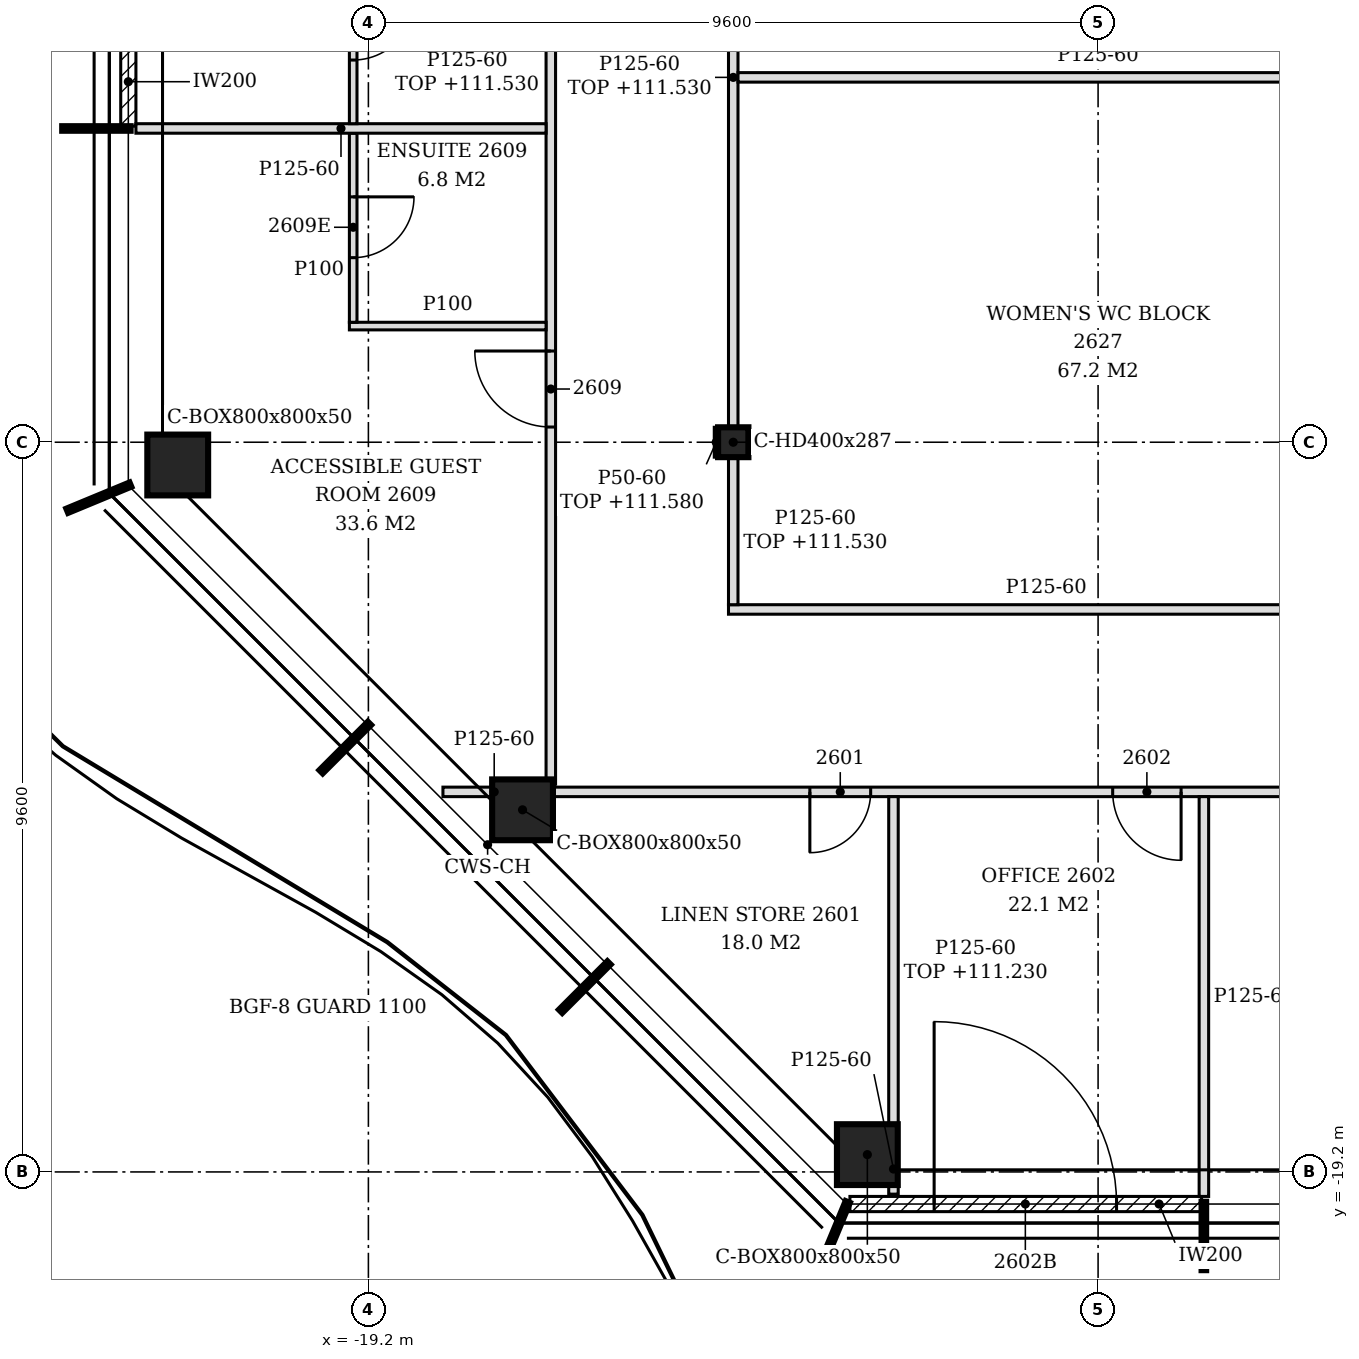
"""IFC4 building model, lengths in metres.
Left out: names, types, materials, properties, quantities, classifications, styles, units other than length and angle.
Written with IfcOpenShell. Run it as: python <this file> out.ifc"""

import sys

from ifc_helpers import new_model, si_unit, direction, frame, frame_2d, origin, origin_2d, place, context, subcontext, project, spatial, polyline, rectangle, hollow_rectangle, i_section, outline, extrude, clip, halfspace, element, fill, save


model = new_model("IFC4")
c1 = context("Model", 3, precision=1e-05, world=origin(), true_north=direction((0.0, 1.0)))
c2 = subcontext(c1, "Body", "Model", "MODEL_VIEW")
j1 = project(units=[si_unit("LENGTHUNIT", "METRE"), si_unit("PLANEANGLEUNIT", "RADIAN")], contexts=[c1])
p1 = place(None, origin())
s1 = spatial("IfcSite", under=j1, at=p1, CompositionType="ELEMENT")
p2 = place(p1, origin())
s2 = spatial("IfcBuilding", under=s1, at=p2, CompositionType="ELEMENT")
p3 = place(p2, frame((0.0, 0.0, 108.6)))
s3 = spatial("IfcBuildingStorey", under=s2, at=p3, CompositionType="ELEMENT", Elevation=108.6)
for number, where, z_axis, x_axis in (
    (1, (-12.635, -18.972, -0.15), (0.186, 0.124, 0.975), (-0.555, 0.832, 0.0)),
    (2, (-21.708, -9.899, -0.15), (0.186, 0.124, 0.975), (-0.555, 0.832, 0.0)),
    (3, (-17.172, -14.436, -0.15), (0.186, 0.124, 0.975), (-0.555, 0.832, 0.0)),
):
    element("IfcColumn", number, at=place(p3, frame(where, z_axis=z_axis, x_axis=x_axis)), inside=s3, PredefinedType="COLUMN", context=c2, shape_type="Clipping", body=[
        clip(clip(extrude(hollow_rectangle(XDim=0.8, YDim=0.8, WallThickness=0.05, at=origin_2d()), origin(), (0.0, 0.0, 1.0), 3.694), halfspace(frame((0.0, 0.0, 0.024), z_axis=(0.0, 0.0, 1.0), x_axis=(1.0, 0.0, 0.0)), True)), halfspace(frame((0.0, 0.0, 3.67), z_axis=(0.0, 0.0, 1.0), x_axis=(1.0, 0.0, 0.0)), False)),
    ])
p4 = place(p3, frame((-14.4, -9.6, -0.15), z_axis=(0.0, 0.0, 1.0), x_axis=(1.0, 0.0, 0.0)))
e4 = element("IfcColumn", 4, at=p4, inside=s3, PredefinedType="COLUMN", context=c2, shape_type="SweptSolid", body=[
    extrude(i_section(OverallWidth=0.399, OverallDepth=0.393, WebThickness=0.023, FlangeThickness=0.037, FilletRadius=0.015, at=origin_2d()), origin(), (0.0, 0.0, 1.0), 3.6),
])
p5 = place(p3, frame((-12.865, -19.622, 0.0), z_axis=(0.0, 0.0, 1.0), x_axis=(1.0, 0.0, 0.0)))
e5 = element("IfcWall", 5, at=p5, inside=s3, PredefinedType="NOTDEFINED", context=c2, shape_type="SweptSolid", body=[
    extrude(rectangle(XDim=4.626, YDim=0.2, at=frame_2d((2.313, 0.0))), origin(), (0.0, 0.0, 1.0), 3.45),
])
p6 = place(p5, frame((1.108, 0.0, 0.0)))
e6 = element("IfcOpeningElement", 6, at=p6, cuts=e5, PredefinedType="OPENING", context=c2, shape_type="SweptSolid", body=[
    extrude(rectangle(XDim=2.4, YDim=2.4, at=frame_2d((1.2, 1.2))), frame((0.0, 0.11, 0.0), z_axis=(0.0, -1.0, 0.0), x_axis=(1.0, 0.0, 0.0)), (0.0, 0.0, 1.0), 0.22),
])
p7 = place(p3, frame((-22.358, -0.702, 0.0), z_axis=(0.0, 0.0, 1.0), x_axis=(0.0, -1.0, 0.0)))
e7 = element("IfcWall", 7, at=p7, inside=s3, PredefinedType="NOTDEFINED", context=c2, shape_type="SweptSolid", body=[
    extrude(rectangle(XDim=4.74, YDim=0.2, at=frame_2d((2.37, 0.0))), origin(), (0.0, 0.0, 1.0), 3.45),
])
p8 = place(p7, frame((1.17, 0.0, 0.0)))
e8 = element("IfcOpeningElement", 8, at=p8, cuts=e7, PredefinedType="OPENING", context=c2, shape_type="SweptSolid", body=[
    extrude(rectangle(XDim=2.4, YDim=2.4, at=frame_2d((1.2, 1.2))), frame((0.0, 0.11, 0.0), z_axis=(0.0, -1.0, 0.0), x_axis=(1.0, 0.0, 0.0)), (0.0, 0.0, 1.0), 0.22),
])
p9 = place(p3, frame((-12.292, -19.492, 0.0), z_axis=(0.0, 0.0, 1.0), x_axis=(0.0, 1.0, 0.0)))
e9 = element("IfcWall", 9, at=p9, inside=s3, PredefinedType="PARTITIONING", context=c2, shape_type="SweptSolid", body=[
    extrude(outline(polyline([(0.0, 0.0), (0.227, 0.0), (0.227, 0.862), (0.227, 1.725), (0.308, 2.587), (0.661, 3.45), (0.0, 3.45), (0.0, 2.587), (0.0, 1.725), (0.0, 0.862), (0.0, 0.0)])), frame((0.0, 0.062, 0.0), z_axis=(0.0, -1.0, 0.0), x_axis=(1.0, 0.0, 0.0)), (0.0, 0.0, 1.0), 0.125),
])
p10 = place(p3, frame((-8.208, -19.522, 0.0), z_axis=(0.0, 0.0, 1.0), x_axis=(0.0, 1.0, 0.0)))
e10 = element("IfcWall", 10, at=p10, inside=s3, PredefinedType="PARTITIONING", context=c2, shape_type="SweptSolid", body=[
    extrude(outline(polyline([(0.0, 0.0), (5.26, 0.0), (5.26, 3.45), (5.009, 3.45), (5.007, 2.93), (4.809, 2.93), (4.807, 3.45), (1.159, 3.45), (1.156, 2.93), (0.859, 2.93), (0.857, 3.45), (0.0, 3.45), (0.0, 0.0)])), frame((0.0, 0.062, 0.0), z_axis=(0.0, -1.0, 0.0), x_axis=(1.0, 0.0, 0.0)), (0.0, 0.0, 1.0), 0.125),
])
p11 = place(p3, frame((-12.292, -18.592, 0.0), z_axis=(0.0, 0.0, 1.0), x_axis=(0.0, 1.0, 0.0)))
e11 = element("IfcWall", 11, at=p11, inside=s3, PredefinedType="PARTITIONING", context=c2, shape_type="SweptSolid", body=[
    extrude(outline(polyline([(0.0, 0.0), (4.33, 0.0), (4.33, 0.862), (4.33, 1.725), (4.33, 2.587), (4.33, 2.63), (0.371, 2.63), (0.371, 2.587), (0.371, 1.725), (0.309, 0.862), (0.0, 0.0)])), frame((0.0, 0.062, 0.0), z_axis=(0.0, -1.0, 0.0), x_axis=(1.0, 0.0, 0.0)), (0.0, 0.0, 1.0), 0.125),
])
p12 = place(p3, frame((-18.219, -14.2, 0.0), z_axis=(0.0, 0.0, 1.0), x_axis=(1.0, 0.0, 0.0)))
e12 = element("IfcWall", 12, at=p12, inside=s3, PredefinedType="PARTITIONING", context=c2, shape_type="SweptSolid", body=[
    extrude(outline(polyline([(0.0, 0.0), (0.586, 0.0), (0.677, 0.862), (0.873, 1.725), (1.111, 2.587), (1.349, 3.45), (0.0, 3.45), (0.0, 2.587), (0.0, 1.725), (0.0, 0.862), (0.0, 0.0)])), frame((0.0, 0.062, 0.0), z_axis=(0.0, -1.0, 0.0), x_axis=(1.0, 0.0, 0.0)), (0.0, 0.0, 1.0), 0.125),
])
p13 = place(p3, frame((-16.753, -14.2, 0.0), z_axis=(0.0, 0.0, 1.0), x_axis=(1.0, 0.0, 0.0)))
e13 = element("IfcWall", 13, at=p13, inside=s3, PredefinedType="PARTITIONING", context=c2, shape_type="SweptSolid", body=[
    extrude(outline(polyline([(0.0, 0.0), (43.232, 0.0), (43.232, 0.862), (43.232, 1.725), (43.232, 2.587), (43.232, 2.63), (0.671, 2.63), (0.667, 2.587), (0.476, 1.725), (0.238, 0.862), (0.0, 0.0)])), frame((0.0, 0.062, 0.0), z_axis=(0.0, -1.0, 0.0), x_axis=(1.0, 0.0, 0.0)), (0.0, 0.0, 1.0), 0.125),
])
p14 = place(p13, frame((3.361, 0.0, 0.0)))
e14 = element("IfcOpeningElement", 14, at=p14, cuts=e13, PredefinedType="OPENING", context=c2, shape_type="SweptSolid", body=[
    extrude(rectangle(XDim=0.8, YDim=2.1, at=frame_2d((0.4, 1.05))), frame((0.0, 0.073, 0.0), z_axis=(0.0, -1.0, 0.0), x_axis=(1.0, 0.0, 0.0)), (0.0, 0.0, 1.0), 0.145),
])
p15 = place(p13, frame((7.345, 0.0, 0.0)))
e15 = element("IfcOpeningElement", 15, at=p15, cuts=e13, PredefinedType="OPENING", context=c2, shape_type="SweptSolid", body=[
    extrude(rectangle(XDim=0.9, YDim=2.1, at=frame_2d((0.45, 1.05))), frame((0.0, 0.073, 0.0), z_axis=(0.0, -1.0, 0.0), x_axis=(1.0, 0.0, 0.0)), (0.0, 0.0, 1.0), 0.145),
])
p16 = place(p13, frame((12.675, 0.0, 0.0)))
e16 = element("IfcOpeningElement", 16, at=p16, cuts=e13, PredefinedType="OPENING", context=c2, shape_type="SweptSolid", body=[
    extrude(rectangle(XDim=0.9, YDim=2.1, at=frame_2d((0.45, 1.05))), frame((0.0, 0.073, 0.0), z_axis=(0.0, -1.0, 0.0), x_axis=(1.0, 0.0, 0.0)), (0.0, 0.0, 1.0), 0.145),
])
p17 = place(p13, frame((16.945, 0.0, 0.0)))
e17 = element("IfcOpeningElement", 17, at=p17, cuts=e13, PredefinedType="OPENING", context=c2, shape_type="SweptSolid", body=[
    extrude(rectangle(XDim=0.9, YDim=2.1, at=frame_2d((0.45, 1.05))), frame((0.0, 0.073, 0.0), z_axis=(0.0, -1.0, 0.0), x_axis=(1.0, 0.0, 0.0)), (0.0, 0.0, 1.0), 0.145),
])
p18 = place(p13, frame((22.089, 0.0, 0.0)))
e18 = element("IfcOpeningElement", 18, at=p18, cuts=e13, PredefinedType="OPENING", context=c2, shape_type="SweptSolid", body=[
    extrude(rectangle(XDim=0.9, YDim=2.1, at=frame_2d((0.45, 1.05))), frame((0.0, 0.073, 0.0), z_axis=(0.0, -1.0, 0.0), x_axis=(1.0, 0.0, 0.0)), (0.0, 0.0, 1.0), 0.145),
])
p19 = place(p13, frame((25.745, 0.0, 0.0)))
e19 = element("IfcOpeningElement", 19, at=p19, cuts=e13, PredefinedType="OPENING", context=c2, shape_type="SweptSolid", body=[
    extrude(rectangle(XDim=0.9, YDim=2.1, at=frame_2d((0.45, 1.05))), frame((0.0, 0.073, 0.0), z_axis=(0.0, -1.0, 0.0), x_axis=(1.0, 0.0, 0.0)), (0.0, 0.0, 1.0), 0.145),
])
p20 = place(p13, frame((28.102, 0.0, 0.0)))
e20 = element("IfcOpeningElement", 20, at=p20, cuts=e13, PredefinedType="OPENING", context=c2, shape_type="SweptSolid", body=[
    extrude(rectangle(XDim=0.9, YDim=2.1, at=frame_2d((0.45, 1.05))), frame((0.0, 0.073, 0.0), z_axis=(0.0, -1.0, 0.0), x_axis=(1.0, 0.0, 0.0)), (0.0, 0.0, 1.0), 0.145),
])
p21 = place(p13, frame((33.953, 0.0, 0.0)))
e21 = element("IfcOpeningElement", 21, at=p21, cuts=e13, PredefinedType="OPENING", context=c2, shape_type="SweptSolid", body=[
    extrude(rectangle(XDim=0.9, YDim=2.1, at=frame_2d((0.45, 1.05))), frame((0.0, 0.073, 0.0), z_axis=(0.0, -1.0, 0.0), x_axis=(1.0, 0.0, 0.0)), (0.0, 0.0, 1.0), 0.145),
])
p22 = place(p13, frame((36.295, 0.0, 0.0)))
e22 = element("IfcOpeningElement", 22, at=p22, cuts=e13, PredefinedType="OPENING", context=c2, shape_type="SweptSolid", body=[
    extrude(rectangle(XDim=0.8, YDim=2.1, at=frame_2d((0.4, 1.05))), frame((0.0, 0.073, 0.0), z_axis=(0.0, -1.0, 0.0), x_axis=(1.0, 0.0, 0.0)), (0.0, 0.0, 1.0), 0.145),
])
p23 = place(p3, frame((-16.8, -14.098, 0.0), z_axis=(0.0, 0.0, 1.0), x_axis=(0.0, 1.0, 0.0)))
e23 = element("IfcWall", 23, at=p23, inside=s3, PredefinedType="PARTITIONING", context=c2, shape_type="SweptSolid", body=[
    extrude(outline(polyline([(0.0, 0.0), (36.515, 0.0), (36.515, 0.862), (36.515, 1.725), (36.578, 2.587), (36.701, 2.93), (0.433, 2.93), (0.433, 2.587), (0.433, 1.725), (0.352, 0.862), (0.0, 0.0)])), frame((0.0, 0.062, 0.0), z_axis=(0.0, -1.0, 0.0), x_axis=(1.0, 0.0, 0.0)), (0.0, 0.0, 1.0), 0.125),
])
p24 = place(p23, frame((4.698, 0.0, 0.0)))
e24 = element("IfcOpeningElement", 24, at=p24, cuts=e23, PredefinedType="OPENING", context=c2, shape_type="SweptSolid", body=[
    extrude(rectangle(XDim=1.0, YDim=2.1, at=frame_2d((0.5, 1.05))), frame((0.0, 0.073, 0.0), z_axis=(0.0, -1.0, 0.0), x_axis=(1.0, 0.0, 0.0)), (0.0, 0.0, 1.0), 0.145),
])
p25 = place(p23, frame((12.426, 0.0, 0.0)))
e25 = element("IfcOpeningElement", 25, at=p25, cuts=e23, PredefinedType="OPENING", context=c2, shape_type="SweptSolid", body=[
    extrude(rectangle(XDim=1.0, YDim=2.1, at=frame_2d((0.5, 1.05))), frame((0.0, 0.073, 0.0), z_axis=(0.0, -1.0, 0.0), x_axis=(1.0, 0.0, 0.0)), (0.0, 0.0, 1.0), 0.145),
])
p26 = place(p23, frame((15.298, 0.0, 0.0)))
e26 = element("IfcOpeningElement", 26, at=p26, cuts=e23, PredefinedType="OPENING", context=c2, shape_type="SweptSolid", body=[
    extrude(rectangle(XDim=0.9, YDim=2.1, at=frame_2d((0.45, 1.05))), frame((0.0, 0.073, 0.0), z_axis=(0.0, -1.0, 0.0), x_axis=(1.0, 0.0, 0.0)), (0.0, 0.0, 1.0), 0.145),
])
p27 = place(p23, frame((18.526, 0.0, 0.0)))
e27 = element("IfcOpeningElement", 27, at=p27, cuts=e23, PredefinedType="OPENING", context=c2, shape_type="SweptSolid", body=[
    extrude(rectangle(XDim=0.9, YDim=2.1, at=frame_2d((0.45, 1.05))), frame((0.0, 0.073, 0.0), z_axis=(0.0, -1.0, 0.0), x_axis=(1.0, 0.0, 0.0)), (0.0, 0.0, 1.0), 0.145),
])
p28 = place(p23, frame((25.198, 0.0, 0.0)))
e28 = element("IfcOpeningElement", 28, at=p28, cuts=e23, PredefinedType="OPENING", context=c2, shape_type="SweptSolid", body=[
    extrude(rectangle(XDim=0.9, YDim=2.1, at=frame_2d((0.45, 1.05))), frame((0.0, 0.073, 0.0), z_axis=(0.0, -1.0, 0.0), x_axis=(1.0, 0.0, 0.0)), (0.0, 0.0, 1.0), 0.145),
])
p29 = place(p23, frame((28.126, 0.0, 0.0)))
e29 = element("IfcOpeningElement", 29, at=p29, cuts=e23, PredefinedType="OPENING", context=c2, shape_type="SweptSolid", body=[
    extrude(rectangle(XDim=0.9, YDim=2.1, at=frame_2d((0.45, 1.05))), frame((0.0, 0.073, 0.0), z_axis=(0.0, -1.0, 0.0), x_axis=(1.0, 0.0, 0.0)), (0.0, 0.0, 1.0), 0.145),
])
p30 = place(p23, frame((32.782, 0.0, 0.0)))
e30 = element("IfcOpeningElement", 30, at=p30, cuts=e23, PredefinedType="OPENING", context=c2, shape_type="SweptSolid", body=[
    extrude(rectangle(XDim=0.9, YDim=2.1, at=frame_2d((0.45, 1.05))), frame((0.0, 0.073, 0.0), z_axis=(0.0, -1.0, 0.0), x_axis=(1.0, 0.0, 0.0)), (0.0, 0.0, 1.0), 0.145),
])
p31 = place(p3, frame((-14.462, -11.8, 0.0), z_axis=(0.0, 0.0, 1.0), x_axis=(1.0, 0.0, 0.0)))
e31 = element("IfcWall", 31, at=p31, inside=s3, PredefinedType="PARTITIONING", context=c2, shape_type="SweptSolid", body=[
    extrude(outline(polyline([(0.0, 0.0), (14.525, 0.0), (14.525, 3.45), (9.812, 3.45), (9.811, 2.83), (9.512, 2.83), (9.51, 3.45), (0.212, 3.45), (0.21, 2.93), (0.0, 2.93), (0.0, 0.0)])), frame((0.0, 0.062, 0.0), z_axis=(0.0, -1.0, 0.0), x_axis=(1.0, 0.0, 0.0)), (0.0, 0.0, 1.0), 0.125),
])
p32 = place(p31, frame((8.363, 0.0, 0.0)))
e32 = element("IfcOpeningElement", 32, at=p32, cuts=e31, PredefinedType="OPENING", context=c2, shape_type="SweptSolid", body=[
    extrude(rectangle(XDim=0.9, YDim=2.1, at=frame_2d((0.45, 1.05))), frame((0.0, 0.073, 0.0), z_axis=(0.0, -1.0, 0.0), x_axis=(1.0, 0.0, 0.0)), (0.0, 0.0, 1.0), 0.145),
])
p33 = place(p3, frame((-14.4, -11.738, 0.0), z_axis=(0.0, 0.0, 1.0), x_axis=(0.0, 1.0, 0.0)))
e33 = element("IfcWall", 33, at=p33, inside=s3, PredefinedType="PARTITIONING", context=c2, shape_type="SweptSolid", body=[
    extrude(rectangle(XDim=1.941, YDim=0.125, at=frame_2d((0.971, 0.0))), origin(), (0.0, 0.0, 1.0), 2.93),
])
p34 = place(p3, frame((-14.4, -9.404, 0.0), z_axis=(0.0, 0.0, 1.0), x_axis=(0.0, 1.0, 0.0)))
e34 = element("IfcWall", 34, at=p34, inside=s3, PredefinedType="PARTITIONING", context=c2, shape_type="SweptSolid", body=[
    extrude(rectangle(XDim=9.207, YDim=0.125, at=frame_2d((4.604, 0.0))), origin(), (0.0, 0.0, 1.0), 2.93),
])
p35 = place(p3, frame((-19.45, -8.072, 0.0), z_axis=(0.0, 0.0, 1.0), x_axis=(1.0, 0.0, 0.0)))
e35 = element("IfcWall", 35, at=p35, inside=s3, PredefinedType="PARTITIONING", context=c2, shape_type="SweptSolid", body=[
    extrude(rectangle(XDim=2.587, YDim=0.1, at=frame_2d((1.294, 0.0))), origin(), (0.0, 0.0, 1.0), 3.45),
])
p36 = place(p3, frame((-19.4, -8.022, 0.0), z_axis=(0.0, 0.0, 1.0), x_axis=(0.0, 1.0, 0.0)))
e36 = element("IfcWall", 36, at=p36, inside=s3, PredefinedType="PARTITIONING", context=c2, shape_type="SweptSolid", body=[
    extrude(rectangle(XDim=2.488, YDim=0.1, at=frame_2d((1.244, 0.0))), origin(), (0.0, 0.0, 1.0), 3.45),
])
p37 = place(p36, frame((0.85, 0.0, 0.0)))
e37 = element("IfcOpeningElement", 37, at=p37, cuts=e36, PredefinedType="OPENING", context=c2, shape_type="SweptSolid", body=[
    extrude(rectangle(XDim=0.8, YDim=2.1, at=frame_2d((0.4, 1.05))), frame((0.0, 0.06, 0.0), z_axis=(0.0, -1.0, 0.0), x_axis=(1.0, 0.0, 0.0)), (0.0, 0.0, 1.0), 0.12),
])
p38 = place(p3, frame((-22.258, -5.472, 0.0), z_axis=(0.0, 0.0, 1.0), x_axis=(1.0, 0.0, 0.0)))
e38 = element("IfcWall", 38, at=p38, inside=s3, PredefinedType="PARTITIONING", context=c2, shape_type="SweptSolid", body=[
    extrude(outline(polyline([(0.0, 0.0), (5.396, 0.0), (5.396, 3.45), (1.388, 3.45), (1.386, 2.93), (1.088, 2.93), (1.086, 3.45), (0.0, 3.45), (0.0, 0.0)])), frame((0.0, 0.062, 0.0), z_axis=(0.0, -1.0, 0.0), x_axis=(1.0, 0.0, 0.0)), (0.0, 0.0, 1.0), 0.125),
])
p39 = place(p3, frame((-19.4, -5.409, 0.0), z_axis=(0.0, 0.0, 1.0), x_axis=(0.0, 1.0, 0.0)))
e39 = element("IfcWall", 39, at=p39, inside=s3, PredefinedType="PARTITIONING", context=c2, shape_type="SweptSolid", body=[
    extrude(outline(polyline([(0.0, 0.0), (2.487, 0.0), (2.488, 3.45), (0.491, 3.45), (0.489, 2.98), (0.301, 2.98), (0.299, 3.45), (0.0, 3.45), (0.0, 0.0)])), frame((0.0, 0.05, 0.0), z_axis=(0.0, -1.0, 0.0), x_axis=(1.0, 0.0, 0.0)), (0.0, 0.0, 1.0), 0.1),
])
p40 = place(p39, frame((0.837, 0.0, 0.0)))
e40 = element("IfcOpeningElement", 40, at=p40, cuts=e39, PredefinedType="OPENING", context=c2, shape_type="SweptSolid", body=[
    extrude(rectangle(XDim=0.8, YDim=2.1, at=frame_2d((0.4, 1.05))), frame((0.0, 0.06, 0.0), z_axis=(0.0, -1.0, 0.0), x_axis=(1.0, 0.0, 0.0)), (0.0, 0.0, 1.0), 0.12),
])
p41 = place(p3, frame((-14.337, -4.8, 0.0), z_axis=(0.0, 0.0, 1.0), x_axis=(1.0, 0.0, 0.0)))
e41 = element("IfcWall", 41, at=p41, inside=s3, PredefinedType="PARTITIONING", context=c2, shape_type="SweptSolid", body=[
    extrude(outline(polyline([(0.0, 0.0), (9.475, 0.0), (9.475, 2.83), (9.387, 2.83), (9.385, 3.45), (0.087, 3.45), (0.085, 2.93), (0.0, 2.93), (0.0, 0.0)])), frame((0.0, 0.062, 0.0), z_axis=(0.0, -1.0, 0.0), x_axis=(1.0, 0.0, 0.0)), (0.0, 0.0, 1.0), 0.125),
])
p42 = place(p3, frame((-14.625, -9.796, 0.0), z_axis=(0.0, 0.0, 1.0), x_axis=(0.0, 1.0, 0.0)))
e42 = element("IfcWall", 42, at=p42, inside=s3, PredefinedType="PARTITIONING", context=c2, shape_type="SweptSolid", body=[
    extrude(rectangle(XDim=0.393, YDim=0.05, at=frame_2d((0.196, 0.0))), origin(), (0.0, 0.0, 1.0), 2.98),
])
p43 = place(p6, origin())
e43 = element("IfcDoor", 43, at=p43, inside=s3, OperationType="SINGLE_SWING_LEFT", PredefinedType="DOOR", context=c2, shape_type="SweptSolid", body=[
    extrude(rectangle(XDim=2.4, YDim=2.4, at=frame_2d((1.2, 1.2))), frame((0.0, 0.025, 0.0), z_axis=(0.0, -1.0, 0.0), x_axis=(1.0, 0.0, 0.0)), (0.0, 0.0, 1.0), 0.05),
])
fill(e6, e43)
p44 = place(p14, frame((0.8, 0.0, 0.0), z_axis=(0.0, 0.0, 1.0), x_axis=(-1.0, 0.0, 0.0)))
e44 = element("IfcDoor", 44, at=p44, inside=s3, OperationType="SINGLE_SWING_RIGHT", PredefinedType="DOOR", context=c2, shape_type="SweptSolid", body=[
    extrude(rectangle(XDim=0.8, YDim=2.1, at=frame_2d((0.4, 1.05))), frame((0.0, 0.025, 0.0), z_axis=(0.0, -1.0, 0.0), x_axis=(1.0, 0.0, 0.0)), (0.0, 0.0, 1.0), 0.05),
])
fill(e14, e44)
p45 = place(p15, frame((0.9, 0.0, 0.0), z_axis=(0.0, 0.0, 1.0), x_axis=(-1.0, 0.0, 0.0)))
e45 = element("IfcDoor", 45, at=p45, inside=s3, OperationType="SINGLE_SWING_LEFT", PredefinedType="DOOR", context=c2, shape_type="SweptSolid", body=[
    extrude(rectangle(XDim=0.9, YDim=2.1, at=frame_2d((0.45, 1.05))), frame((0.0, 0.025, 0.0), z_axis=(0.0, -1.0, 0.0), x_axis=(1.0, 0.0, 0.0)), (0.0, 0.0, 1.0), 0.05),
])
fill(e15, e45)
p46 = place(p24, origin())
e46 = element("IfcDoor", 46, at=p46, inside=s3, OperationType="SINGLE_SWING_RIGHT", PredefinedType="DOOR", context=c2, shape_type="SweptSolid", body=[
    extrude(rectangle(XDim=1.0, YDim=2.1, at=frame_2d((0.5, 1.05))), frame((0.0, 0.025, 0.0), z_axis=(0.0, -1.0, 0.0), x_axis=(1.0, 0.0, 0.0)), (0.0, 0.0, 1.0), 0.05),
])
fill(e24, e46)
p47 = place(p37, frame((0.8, 0.0, 0.0), z_axis=(0.0, 0.0, 1.0), x_axis=(-1.0, 0.0, 0.0)))
e47 = element("IfcDoor", 47, at=p47, inside=s3, OperationType="SINGLE_SWING_LEFT", PredefinedType="DOOR", context=c2, shape_type="SweptSolid", body=[
    extrude(rectangle(XDim=0.8, YDim=2.1, at=frame_2d((0.4, 1.05))), frame((0.0, 0.025, 0.0), z_axis=(0.0, -1.0, 0.0), x_axis=(1.0, 0.0, 0.0)), (0.0, 0.0, 1.0), 0.05),
])
fill(e37, e47)
p48 = place(p40, frame((0.8, 0.0, 0.0), z_axis=(0.0, 0.0, 1.0), x_axis=(-1.0, 0.0, 0.0)))
e48 = element("IfcDoor", 48, at=p48, inside=s3, OperationType="SINGLE_SWING_LEFT", PredefinedType="DOOR", context=c2, shape_type="SweptSolid", body=[
    extrude(rectangle(XDim=0.8, YDim=2.1, at=frame_2d((0.4, 1.05))), frame((0.0, 0.025, 0.0), z_axis=(0.0, -1.0, 0.0), x_axis=(1.0, 0.0, 0.0)), (0.0, 0.0, 1.0), 0.05),
])
fill(e40, e48)
save(model, sys.argv[1])
